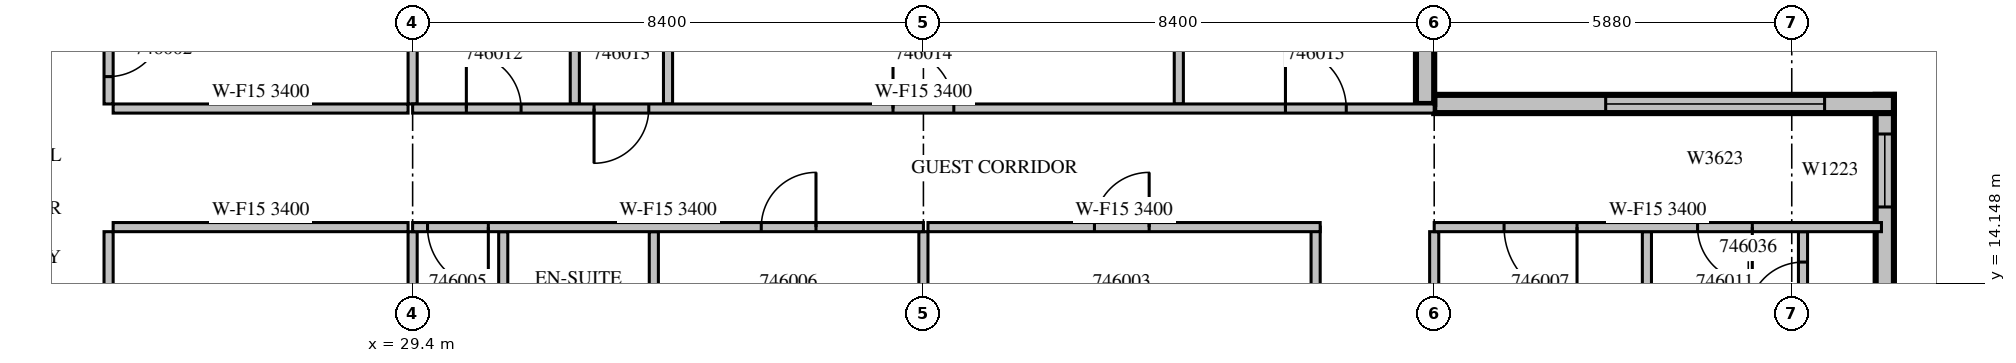
"""IFC4 building model, lengths in metres.
Left out: names, types, materials, properties, quantities, classifications, styles, units other than length and angle.
Written with IfcOpenShell. Run it as: python <this file> out.ifc"""

import sys

from ifc_helpers import new_model, si_unit, direction, frame, frame_2d, origin, place, context, subcontext, project, spatial, rectangle, extrude, source, transform, mapped, element, fill, save


model = new_model("IFC4")
c1 = context("Model", 3, precision=1e-05, world=origin(), true_north=direction((0.0, 1.0)))
c2 = subcontext(c1, "Body", "Model", "MODEL_VIEW")
j1 = project(units=[si_unit("LENGTHUNIT", "METRE"), si_unit("PLANEANGLEUNIT", "RADIAN")], contexts=[c1])
p1 = place(None, origin())
s1 = spatial("IfcSite", under=j1, at=p1, CompositionType="ELEMENT")
p2 = place(p1, origin())
s2 = spatial("IfcBuilding", under=s1, at=p2, CompositionType="ELEMENT")
p3 = place(p2, frame((0.0, 0.0, 208.2)))
s3 = spatial("IfcBuildingStorey", under=s2, at=p3, CompositionType="ELEMENT", Elevation=208.2)
m1 = source(origin(), c2, "Body", "SweptSolid", [
    extrude(rectangle(XDim=3.375, YDim=0.3, at=frame_2d((1.688, 0.0))), origin(), (0.0, 0.0, 1.0), 3.4),
])
p4 = place(p3, frame((53.61, 13.875, 0.0), z_axis=(0.0, 0.0, 1.0), x_axis=(0.0, 1.0, 0.0)))
e1 = element("IfcWall", 1, at=p4, inside=s3, PredefinedType="STANDARD", context=c2, shape_type="MappedRepresentation", body=[
    mapped(m1, transform((0.0, 0.0, 0.0), scale=1.0)),
])
m2 = source(origin(), c2, "Body", "SweptSolid", [
    extrude(rectangle(XDim=1.2, YDim=2.3, at=frame_2d((0.6, 1.15))), frame((0.0, 0.16, 0.0), z_axis=(0.0, -1.0, 0.0), x_axis=(1.0, 0.0, 0.0)), (0.0, 0.0, 1.0), 0.32),
])
p5 = place(p4, frame((1.531, 0.0, 0.6)))
e2 = element("IfcOpeningElement", 2, at=p5, cuts=e1, PredefinedType="OPENING", context=c2, shape_type="MappedRepresentation", body=[
    mapped(m2, transform((0.0, 0.0, 0.0), scale=1.0)),
])
m3 = source(origin(), c2, "Body", "SweptSolid", [
    extrude(rectangle(XDim=7.56, YDim=0.3, at=frame_2d((3.78, 0.0))), origin(), (0.0, 0.0, 1.0), 3.4),
])
p6 = place(p3, frame((53.76, 17.1, 0.0), z_axis=(0.0, 0.0, 1.0), x_axis=(-1.0, 0.0, 0.0)))
e3 = element("IfcWall", 3, at=p6, inside=s3, PredefinedType="STANDARD", context=c2, shape_type="MappedRepresentation", body=[
    mapped(m3, transform((0.0, 0.0, 0.0), scale=1.0)),
])
m4 = source(origin(), c2, "Body", "SweptSolid", [
    extrude(rectangle(XDim=3.6, YDim=2.3, at=frame_2d((1.8, 1.15))), frame((0.0, 0.16, 0.0), z_axis=(0.0, -1.0, 0.0), x_axis=(1.0, 0.0, 0.0)), (0.0, 0.0, 1.0), 0.32),
])
p7 = place(p6, frame((1.14, 0.0, 0.6)))
e4 = element("IfcOpeningElement", 4, at=p7, cuts=e3, PredefinedType="OPENING", context=c2, shape_type="MappedRepresentation", body=[
    mapped(m4, transform((0.0, 0.0, 0.0), scale=1.0)),
])
m5 = source(origin(), c2, "Body", "SweptSolid", [
    extrude(rectangle(XDim=3.0, YDim=0.3, at=frame_2d((1.5, 0.0))), origin(), (0.0, 0.0, 1.0), 3.4),
])
p8 = place(p3, frame((46.05, 17.1, 0.0), z_axis=(0.0, 0.0, 1.0), x_axis=(0.0, 1.0, 0.0)))
e5 = element("IfcWall", 5, at=p8, inside=s3, PredefinedType="STANDARD", context=c2, shape_type="MappedRepresentation", body=[
    mapped(m5, transform((0.0, 0.0, 0.0), scale=1.0)),
])
p9 = place(p8, frame((1.425, 0.0, 0.6)))
e6 = element("IfcOpeningElement", 6, at=p9, cuts=e5, PredefinedType="OPENING", context=c2, shape_type="MappedRepresentation", body=[
    mapped(m2, transform((0.0, 0.0, 0.0), scale=1.0)),
])
m6 = source(origin(), c2, "Body", "SweptSolid", [
    extrude(rectangle(XDim=4.295, YDim=0.15, at=frame_2d((2.147, 0.0))), origin(), (0.0, 0.0, 1.0), 3.4),
])
p10 = place(p3, frame((24.4, 15.0, 0.0), z_axis=(0.0, 0.0, 1.0), x_axis=(0.0, -1.0, 0.0)))
e7 = element("IfcWall", 7, at=p10, inside=s3, PredefinedType="PARTITIONING", context=c2, shape_type="MappedRepresentation", body=[
    mapped(m6, transform((0.0, 0.0, 0.0), scale=1.0)),
])
m7 = source(origin(), c2, "Body", "SweptSolid", [
    extrude(rectangle(XDim=0.9, YDim=2.1, at=frame_2d((0.45, 1.05))), frame((0.0, 0.085, 0.0), z_axis=(0.0, -1.0, 0.0), x_axis=(1.0, 0.0, 0.0)), (0.0, 0.0, 1.0), 0.17),
])
p11 = place(p10, frame((1.113, 0.0, 0.0)))
e8 = element("IfcOpeningElement", 8, at=p11, cuts=e7, PredefinedType="OPENING", context=c2, shape_type="MappedRepresentation", body=[
    mapped(m7, transform((0.0, 0.0, 0.0), scale=1.0)),
])
m8 = source(origin(), c2, "Body", "SweptSolid", [
    extrude(rectangle(XDim=3.6, YDim=0.15, at=frame_2d((1.8, 0.0))), origin(), (0.0, 0.0, 1.0), 3.4),
])
p12 = place(p3, frame((24.4, 20.7, 0.0), z_axis=(0.0, 0.0, 1.0), x_axis=(0.0, -1.0, 0.0)))
e9 = element("IfcWall", 9, at=p12, inside=s3, PredefinedType="PARTITIONING", context=c2, shape_type="MappedRepresentation", body=[
    mapped(m8, transform((0.0, 0.0, 0.0), scale=1.0)),
])
p13 = place(p12, frame((2.25, 0.0, 0.0)))
e10 = element("IfcOpeningElement", 10, at=p13, cuts=e9, PredefinedType="OPENING", context=c2, shape_type="MappedRepresentation", body=[
    mapped(m7, transform((0.0, 0.0, 0.0), scale=1.0)),
])
m9 = source(origin(), c2, "Body", "SweptSolid", [
    extrude(rectangle(XDim=4.85, YDim=0.15, at=frame_2d((2.425, 0.0))), origin(), (0.0, 0.0, 1.0), 3.4),
])
for number, where, z_axis, x_axis in (
    (11, (29.325, 15.075, 0.0), (0.0, 0.0, 1.0), (-1.0, 0.0, 0.0)),
    (12, (24.475, 17.025, 0.0), (0.0, 0.0, 1.0), (1.0, 0.0, 0.0)),
):
    element("IfcWall", number, at=place(p3, frame(where, z_axis=z_axis, x_axis=x_axis)), inside=s3, PredefinedType="PARTITIONING", context=c2, shape_type="MappedRepresentation", body=[
        mapped(m9, transform((0.0, 0.0, 0.0), scale=1.0)),
    ])
m10 = source(origin(), c2, "Body", "SweptSolid", [
    extrude(rectangle(XDim=4.051, YDim=0.15, at=frame_2d((2.026, 0.0))), origin(), (0.0, 0.0, 1.0), 3.4),
])
p14 = place(p3, frame((29.4, 10.949, 0.0), z_axis=(0.0, 0.0, 1.0), x_axis=(0.0, 1.0, 0.0)))
e13 = element("IfcWall", 13, at=p14, inside=s3, PredefinedType="PARTITIONING", context=c2, shape_type="MappedRepresentation", body=[
    mapped(m10, transform((0.0, 0.0, 0.0), scale=1.0)),
])
m11 = source(origin(), c2, "Body", "SweptSolid", [
    extrude(rectangle(XDim=3.001, YDim=0.15, at=frame_2d((1.5, 0.0))), origin(), (0.0, 0.0, 1.0), 3.4),
])
p15 = place(p3, frame((29.4, 17.1, 0.0), z_axis=(0.0, 0.0, 1.0), x_axis=(0.0, 1.0, 0.0)))
e14 = element("IfcWall", 14, at=p15, inside=s3, PredefinedType="PARTITIONING", context=c2, shape_type="MappedRepresentation", body=[
    mapped(m11, transform((0.0, 0.0, 0.0), scale=1.0)),
])
m12 = source(origin(), c2, "Body", "SweptSolid", [
    extrude(rectangle(XDim=3.975, YDim=0.15, at=frame_2d((1.988, 0.0))), origin(), (0.0, 0.0, 1.0), 3.4),
])
p16 = place(p3, frame((44.25, 11.1, 0.0), z_axis=(0.0, 0.0, 1.0), x_axis=(0.0, 1.0, 0.0)))
e15 = element("IfcWall", 15, at=p16, inside=s3, PredefinedType="PARTITIONING", context=c2, shape_type="MappedRepresentation", body=[
    mapped(m12, transform((0.0, 0.0, 0.0), scale=1.0)),
])
m13 = source(origin(), c2, "Body", "SweptSolid", [
    extrude(rectangle(XDim=6.45, YDim=0.15, at=frame_2d((3.225, 0.0))), origin(), (0.0, 0.0, 1.0), 3.4),
])
p17 = place(p3, frame((44.325, 15.075, 0.0), z_axis=(0.0, 0.0, 1.0), x_axis=(-1.0, 0.0, 0.0)))
e16 = element("IfcWall", 16, at=p17, inside=s3, PredefinedType="PARTITIONING", context=c2, shape_type="MappedRepresentation", body=[
    mapped(m13, transform((0.0, 0.0, 0.0), scale=1.0)),
])
p18 = place(p17, frame((2.812, 0.0, 0.0)))
e17 = element("IfcOpeningElement", 17, at=p18, cuts=e16, PredefinedType="OPENING", context=c2, shape_type="MappedRepresentation", body=[
    mapped(m7, transform((0.0, 0.0, 0.0), scale=1.0)),
])
p19 = place(p3, frame((30.89, 10.705, 0.0), z_axis=(0.0, 0.0, 1.0), x_axis=(0.0, 1.0, 0.0)))
e18 = element("IfcWall", 18, at=p19, inside=s3, PredefinedType="PARTITIONING", context=c2, shape_type="MappedRepresentation", body=[
    mapped(m6, transform((0.0, 0.0, 0.0), scale=1.0)),
])
p20 = place(p19, frame((1.698, 0.0, 0.0)))
e19 = element("IfcOpeningElement", 19, at=p20, cuts=e18, PredefinedType="OPENING", context=c2, shape_type="MappedRepresentation", body=[
    mapped(m7, transform((0.0, 0.0, 0.0), scale=1.0)),
])
p21 = place(p3, frame((33.367, 10.705, 0.0), z_axis=(0.0, 0.0, 1.0), x_axis=(0.0, 1.0, 0.0)))
e20 = element("IfcWall", 20, at=p21, inside=s3, PredefinedType="PARTITIONING", context=c2, shape_type="MappedRepresentation", body=[
    mapped(m6, transform((0.0, 0.0, 0.0), scale=1.0)),
])
p22 = place(p3, frame((37.8, 10.949, 0.0), z_axis=(0.0, 0.0, 1.0), x_axis=(0.0, 1.0, 0.0)))
e21 = element("IfcWall", 21, at=p22, inside=s3, PredefinedType="PARTITIONING", context=c2, shape_type="MappedRepresentation", body=[
    mapped(m10, transform((0.0, 0.0, 0.0), scale=1.0)),
])
m14 = source(origin(), c2, "Body", "SweptSolid", [
    extrude(rectangle(XDim=3.9, YDim=0.15, at=frame_2d((1.95, 0.0))), origin(), (0.0, 0.0, 1.0), 3.4),
])
p23 = place(p3, frame((49.698, 11.1, 0.0), z_axis=(0.0, 0.0, 1.0), x_axis=(0.0, 1.0, 0.0)))
e22 = element("IfcWall", 22, at=p23, inside=s3, PredefinedType="PARTITIONING", context=c2, shape_type="MappedRepresentation", body=[
    mapped(m14, transform((0.0, 0.0, 0.0), scale=1.0)),
])
p24 = place(p3, frame((52.265, 11.1, 0.0), z_axis=(0.0, 0.0, 1.0), x_axis=(0.0, 1.0, 0.0)))
e23 = element("IfcWall", 23, at=p24, inside=s3, PredefinedType="PARTITIONING", context=c2, shape_type="MappedRepresentation", body=[
    mapped(m14, transform((0.0, 0.0, 0.0), scale=1.0)),
])
p25 = place(p24, frame((1.5, 0.0, 0.0)))
e24 = element("IfcOpeningElement", 24, at=p25, cuts=e23, PredefinedType="OPENING", context=c2, shape_type="MappedRepresentation", body=[
    mapped(m7, transform((0.0, 0.0, 0.0), scale=1.0)),
])
p26 = place(p24, frame((2.5, 0.0, 0.0)))
e25 = element("IfcOpeningElement", 25, at=p26, cuts=e23, PredefinedType="OPENING", context=c2, shape_type="MappedRepresentation", body=[
    mapped(m7, transform((0.0, 0.0, 0.0), scale=1.0)),
])
p27 = place(p24, frame((0.5, 0.0, 0.0)))
e26 = element("IfcOpeningElement", 26, at=p27, cuts=e23, PredefinedType="OPENING", context=c2, shape_type="MappedRepresentation", body=[
    mapped(m7, transform((0.0, 0.0, 0.0), scale=1.0)),
])
p28 = place(p3, frame((46.2, 11.1, 0.0), z_axis=(0.0, 0.0, 1.0), x_axis=(0.0, 1.0, 0.0)))
e27 = element("IfcWall", 27, at=p28, inside=s3, PredefinedType="PARTITIONING", context=c2, shape_type="MappedRepresentation", body=[
    mapped(m14, transform((0.0, 0.0, 0.0), scale=1.0)),
])
for number, where, z_axis, x_axis in (
    (28, (32.067, 20.7, 0.0), (0.0, 0.0, 1.0), (0.0, -1.0, 0.0)),
    (29, (33.6, 17.1, 0.0), (0.0, 0.0, 1.0), (0.0, 1.0, 0.0)),
    (30, (42.0, 17.1, 0.0), (0.0, 0.0, 1.0), (0.0, 1.0, 0.0)),
):
    element("IfcWall", number, at=place(p3, frame(where, z_axis=z_axis, x_axis=x_axis)), inside=s3, PredefinedType="PARTITIONING", context=c2, shape_type="MappedRepresentation", body=[
        mapped(m8, transform((0.0, 0.0, 0.0), scale=1.0)),
    ])
m15 = source(origin(), c2, "Body", "SweptSolid", [
    extrude(rectangle(XDim=8.4, YDim=0.15, at=frame_2d((4.2, 0.0))), origin(), (0.0, 0.0, 1.0), 3.4),
])
p29 = place(p3, frame((37.8, 15.075, 0.0), z_axis=(0.0, 0.0, 1.0), x_axis=(-1.0, 0.0, 0.0)))
e31 = element("IfcWall", 31, at=p29, inside=s3, PredefinedType="PARTITIONING", context=c2, shape_type="MappedRepresentation", body=[
    mapped(m15, transform((0.0, 0.0, 0.0), scale=1.0)),
])
m16 = source(origin(), c2, "Body", "SweptSolid", [
    extrude(rectangle(XDim=1.0, YDim=2.1, at=frame_2d((0.5, 1.05))), frame((0.0, 0.085, 0.0), z_axis=(0.0, -1.0, 0.0), x_axis=(1.0, 0.0, 0.0)), (0.0, 0.0, 1.0), 0.17),
])
p30 = place(p29, frame((7.155, 0.0, 0.0)))
e32 = element("IfcOpeningElement", 32, at=p30, cuts=e31, PredefinedType="OPENING", context=c2, shape_type="MappedRepresentation", body=[
    mapped(m16, transform((0.0, 0.0, 0.0), scale=1.0)),
])
p31 = place(p29, frame((1.767, 0.0, 0.0)))
e33 = element("IfcOpeningElement", 33, at=p31, cuts=e31, PredefinedType="OPENING", context=c2, shape_type="MappedRepresentation", body=[
    mapped(m7, transform((0.0, 0.0, 0.0), scale=1.0)),
])
m17 = source(origin(), c2, "Body", "SweptSolid", [
    extrude(rectangle(XDim=7.355, YDim=0.15, at=frame_2d((3.678, 0.0))), origin(), (0.0, 0.0, 1.0), 3.4),
])
p32 = place(p3, frame((53.555, 15.075, 0.0), z_axis=(0.0, 0.0, 1.0), x_axis=(-1.0, 0.0, 0.0)))
e34 = element("IfcWall", 34, at=p32, inside=s3, PredefinedType="PARTITIONING", context=c2, shape_type="MappedRepresentation", body=[
    mapped(m17, transform((0.0, 0.0, 0.0), scale=1.0)),
])
m18 = source(origin(), c2, "Body", "SweptSolid", [
    extrude(rectangle(XDim=1.2, YDim=2.1, at=frame_2d((0.6, 1.05))), frame((0.0, 0.085, 0.0), z_axis=(0.0, -1.0, 0.0), x_axis=(1.0, 0.0, 0.0)), (0.0, 0.0, 1.0), 0.17),
])
p33 = place(p32, frame((5.006, 0.0, 0.0)))
e35 = element("IfcOpeningElement", 35, at=p33, cuts=e34, PredefinedType="OPENING", context=c2, shape_type="MappedRepresentation", body=[
    mapped(m18, transform((0.0, 0.0, 0.0), scale=1.0)),
])
p34 = place(p32, frame((2.124, 0.0, 0.0)))
e36 = element("IfcOpeningElement", 36, at=p34, cuts=e34, PredefinedType="OPENING", context=c2, shape_type="MappedRepresentation", body=[
    mapped(m7, transform((0.0, 0.0, 0.0), scale=1.0)),
])
m19 = source(origin(), c2, "Body", "SweptSolid", [
    extrude(rectangle(XDim=16.8, YDim=0.15, at=frame_2d((8.4, 0.0))), origin(), (0.0, 0.0, 1.0), 3.4),
])
p35 = place(p3, frame((29.4, 17.025, 0.0), z_axis=(0.0, 0.0, 1.0), x_axis=(1.0, 0.0, 0.0)))
e37 = element("IfcWall", 37, at=p35, inside=s3, PredefinedType="PARTITIONING", context=c2, shape_type="MappedRepresentation", body=[
    mapped(m19, transform((0.0, 0.0, 0.0), scale=1.0)),
])
p36 = place(p35, frame((0.883, 0.0, 0.0)))
e38 = element("IfcOpeningElement", 38, at=p36, cuts=e37, PredefinedType="OPENING", context=c2, shape_type="MappedRepresentation", body=[
    mapped(m7, transform((0.0, 0.0, 0.0), scale=1.0)),
])
p37 = place(p35, frame((2.983, 0.0, 0.0)))
e39 = element("IfcOpeningElement", 39, at=p37, cuts=e37, PredefinedType="OPENING", context=c2, shape_type="MappedRepresentation", body=[
    mapped(m7, transform((0.0, 0.0, 0.0), scale=1.0)),
])
p38 = place(p35, frame((7.9, 0.0, 0.0)))
e40 = element("IfcOpeningElement", 40, at=p38, cuts=e37, PredefinedType="OPENING", context=c2, shape_type="MappedRepresentation", body=[
    mapped(m16, transform((0.0, 0.0, 0.0), scale=1.0)),
])
p39 = place(p35, frame((14.354, 0.0, 0.0)))
e41 = element("IfcOpeningElement", 41, at=p39, cuts=e37, PredefinedType="OPENING", context=c2, shape_type="MappedRepresentation", body=[
    mapped(m16, transform((0.0, 0.0, 0.0), scale=1.0)),
])
m20 = source(origin(), c2, "Body", "SweptSolid", [
    extrude(rectangle(XDim=1.2, YDim=2.3, at=frame_2d((0.6, 1.15))), frame((0.0, 0.03, 0.0), z_axis=(0.0, -1.0, 0.0), x_axis=(1.0, 0.0, 0.0)), (0.0, 0.0, 1.0), 0.06),
])
p40 = place(p5, origin())
e42 = element("IfcWindow", 42, at=p40, inside=s3, PartitioningType="SINGLE_PANEL", PredefinedType="WINDOW", context=c2, shape_type="MappedRepresentation", body=[
    mapped(m20, transform((0.0, 0.0, 0.0), scale=1.0)),
])
fill(e2, e42)
m21 = source(origin(), c2, "Body", "SweptSolid", [
    extrude(rectangle(XDim=3.6, YDim=2.3, at=frame_2d((1.8, 1.15))), frame((0.0, 0.03, 0.0), z_axis=(0.0, -1.0, 0.0), x_axis=(1.0, 0.0, 0.0)), (0.0, 0.0, 1.0), 0.06),
])
p41 = place(p7, origin())
e43 = element("IfcWindow", 43, at=p41, inside=s3, PartitioningType="SINGLE_PANEL", PredefinedType="WINDOW", context=c2, shape_type="MappedRepresentation", body=[
    mapped(m21, transform((0.0, 0.0, 0.0), scale=1.0)),
])
fill(e4, e43)
m22 = source(origin(), c2, "Body", "SweptSolid", [
    extrude(rectangle(XDim=0.9, YDim=2.1, at=frame_2d((0.45, 1.05))), frame((0.0, 0.025, 0.0), z_axis=(0.0, -1.0, 0.0), x_axis=(1.0, 0.0, 0.0)), (0.0, 0.0, 1.0), 0.05),
])
p42 = place(p13, origin())
e44 = element("IfcDoor", 44, at=p42, inside=s3, OperationType="SINGLE_SWING_LEFT", PredefinedType="DOOR", context=c2, shape_type="MappedRepresentation", body=[
    mapped(m22, transform((0.0, 0.0, 0.0), scale=1.0)),
])
fill(e10, e44)
p43 = place(p18, origin())
e45 = element("IfcDoor", 45, at=p43, inside=s3, OperationType="SINGLE_SWING_RIGHT", PredefinedType="DOOR", context=c2, shape_type="MappedRepresentation", body=[
    mapped(m22, transform((0.0, 0.0, 0.0), scale=1.0)),
])
fill(e17, e45)
m23 = source(origin(), c2, "Body", "SweptSolid", [
    extrude(rectangle(XDim=1.0, YDim=2.1, at=frame_2d((0.5, 1.05))), frame((0.0, 0.025, 0.0), z_axis=(0.0, -1.0, 0.0), x_axis=(1.0, 0.0, 0.0)), (0.0, 0.0, 1.0), 0.05),
])
p44 = place(p30, origin())
e46 = element("IfcDoor", 46, at=p44, inside=s3, OperationType="SINGLE_SWING_LEFT", PredefinedType="DOOR", context=c2, shape_type="MappedRepresentation", body=[
    mapped(m23, transform((0.0, 0.0, 0.0), scale=1.0)),
])
fill(e32, e46)
p45 = place(p31, origin())
e47 = element("IfcDoor", 47, at=p45, inside=s3, OperationType="SINGLE_SWING_RIGHT", PredefinedType="DOOR", context=c2, shape_type="MappedRepresentation", body=[
    mapped(m22, transform((0.0, 0.0, 0.0), scale=1.0)),
])
fill(e33, e47)
m24 = source(origin(), c2, "Body", "SweptSolid", [
    extrude(rectangle(XDim=1.2, YDim=2.1, at=frame_2d((0.6, 1.05))), frame((0.0, 0.025, 0.0), z_axis=(0.0, -1.0, 0.0), x_axis=(1.0, 0.0, 0.0)), (0.0, 0.0, 1.0), 0.05),
])
p46 = place(p33, origin())
e48 = element("IfcDoor", 48, at=p46, inside=s3, OperationType="SINGLE_SWING_LEFT", PredefinedType="DOOR", context=c2, shape_type="MappedRepresentation", body=[
    mapped(m24, transform((0.0, 0.0, 0.0), scale=1.0)),
])
fill(e35, e48)
p47 = place(p34, origin())
e49 = element("IfcDoor", 49, at=p47, inside=s3, OperationType="SINGLE_SWING_LEFT", PredefinedType="DOOR", context=c2, shape_type="MappedRepresentation", body=[
    mapped(m22, transform((0.0, 0.0, 0.0), scale=1.0)),
])
fill(e36, e49)
p48 = place(p36, origin())
e50 = element("IfcDoor", 50, at=p48, inside=s3, OperationType="SINGLE_SWING_LEFT", PredefinedType="DOOR", context=c2, shape_type="MappedRepresentation", body=[
    mapped(m22, transform((0.0, 0.0, 0.0), scale=1.0)),
])
fill(e38, e50)
p49 = place(p37, origin())
e51 = element("IfcDoor", 51, at=p49, inside=s3, OperationType="SINGLE_SWING_RIGHT", PredefinedType="DOOR", context=c2, shape_type="MappedRepresentation", body=[
    mapped(m22, transform((0.0, 0.0, 0.0), scale=1.0)),
])
fill(e39, e51)
p50 = place(p38, origin())
e52 = element("IfcDoor", 52, at=p50, inside=s3, OperationType="SINGLE_SWING_LEFT", PredefinedType="DOOR", context=c2, shape_type="MappedRepresentation", body=[
    mapped(m23, transform((0.0, 0.0, 0.0), scale=1.0)),
])
fill(e40, e52)
p51 = place(p39, origin())
e53 = element("IfcDoor", 53, at=p51, inside=s3, OperationType="SINGLE_SWING_LEFT", PredefinedType="DOOR", context=c2, shape_type="MappedRepresentation", body=[
    mapped(m23, transform((0.0, 0.0, 0.0), scale=1.0)),
])
fill(e41, e53)
p52 = place(p26, origin())
e54 = element("IfcDoor", 54, at=p52, inside=s3, OperationType="SINGLE_SWING_LEFT", PredefinedType="DOOR", context=c2, shape_type="MappedRepresentation", body=[
    mapped(m22, transform((0.0, 0.0, 0.0), scale=1.0)),
])
fill(e25, e54)
save(model, sys.argv[1])
